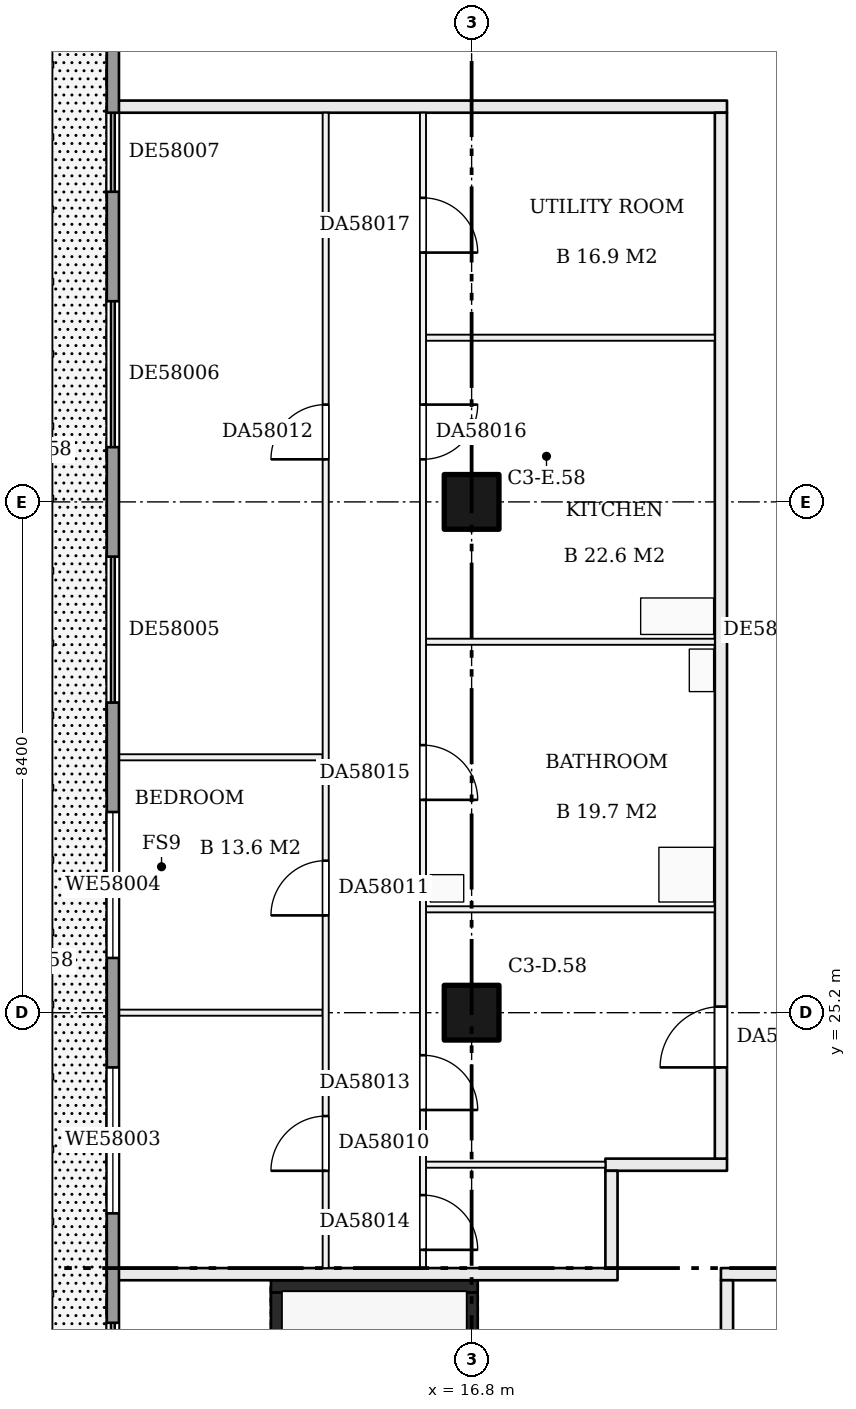
"""IFC4 building model, lengths in metres.
Left out: names, types, materials, properties, quantities, classifications, styles, units other than length and angle.
Written with IfcOpenShell. Run it as: python <this file> out.ifc"""

import sys

from ifc_helpers import new_model, si_unit, direction, frame, frame_2d, origin, origin_2d, place, context, subcontext, project, spatial, rectangle, extrude, element, fill, save


model = new_model("IFC4")
c1 = context("Model", 3, precision=1e-05, world=origin(), true_north=direction((0.0, 1.0)))
c2 = subcontext(c1, "Body", "Model", "MODEL_VIEW")
j1 = project(units=[si_unit("LENGTHUNIT", "METRE"), si_unit("PLANEANGLEUNIT", "RADIAN")], contexts=[c1])
p1 = place(None, origin())
s1 = spatial("IfcSite", under=j1, at=p1, CompositionType="ELEMENT")
p2 = place(p1, origin())
s2 = spatial("IfcBuilding", under=s1, at=p2, CompositionType="ELEMENT")
p3 = place(p2, frame((0.0, 0.0, 224.7)))
s3 = spatial("IfcBuildingStorey", under=s2, at=p3, CompositionType="ELEMENT", Elevation=224.7)
for number, where, z_axis, x_axis in (
    (1, (16.8, 25.2, 0.0), (0.0, 0.0, 1.0), (1.0, 0.0, 0.0)),
    (2, (16.8, 33.6, 0.0), (0.0, 0.0, 1.0), (1.0, 0.0, 0.0)),
):
    element("IfcColumn", number, at=place(p3, frame(where, z_axis=z_axis, x_axis=x_axis)), inside=s3, PredefinedType="COLUMN", context=c2, shape_type="SweptSolid", body=[
        extrude(rectangle(XDim=0.9, YDim=0.9, at=origin_2d()), origin(), (0.0, 0.0, 1.0), 3.22),
    ])
p4 = place(p3, frame((13.6, 13.8, 0.0), z_axis=(0.0, 0.0, 1.0), x_axis=(0.0, 1.0, 0.0)))
e3 = element("IfcWall", 3, at=p4, inside=s3, PredefinedType="SHEAR", context=c2, shape_type="SweptSolid", body=[
    extrude(rectangle(XDim=6.8, YDim=0.2, at=frame_2d((3.4, 0.0))), origin(), (0.0, 0.0, 1.0), 3.22),
])
p5 = place(p3, frame((16.8, 13.8, 0.0), z_axis=(0.0, 0.0, 1.0), x_axis=(0.0, 1.0, 0.0)))
e4 = element("IfcWall", 4, at=p5, inside=s3, PredefinedType="SHEAR", context=c2, shape_type="SweptSolid", body=[
    extrude(rectangle(XDim=6.8, YDim=0.2, at=frame_2d((3.4, 0.0))), origin(), (0.0, 0.0, 1.0), 3.22),
])
p6 = place(p5, frame((0.1, 0.0, 0.0)))
e5 = element("IfcOpeningElement", 5, at=p6, cuts=e4, PredefinedType="OPENING", context=c2, shape_type="SweptSolid", body=[
    extrude(rectangle(XDim=1.0, YDim=2.1, at=frame_2d((0.5, 1.05))), frame((0.0, 0.11, 0.0), z_axis=(0.0, -1.0, 0.0), x_axis=(1.0, 0.0, 0.0)), (0.0, 0.0, 1.0), 0.22),
])
p7 = place(p3, frame((13.5, 20.7, 0.0), z_axis=(0.0, 0.0, 1.0), x_axis=(1.0, 0.0, 0.0)))
e6 = element("IfcWall", 6, at=p7, inside=s3, PredefinedType="SHEAR", context=c2, shape_type="SweptSolid", body=[
    extrude(rectangle(XDim=3.4, YDim=0.2, at=frame_2d((1.7, 0.0))), origin(), (0.0, 0.0, 1.0), 3.22),
])
p8 = place(p3, frame((10.9, 20.9, 0.0), z_axis=(0.0, 0.0, 1.0), x_axis=(1.0, 0.0, 0.0)))
e7 = element("IfcWall", 7, at=p8, inside=s3, PredefinedType="PARTITIONING", context=c2, shape_type="SweptSolid", body=[
    extrude(rectangle(XDim=8.3, YDim=0.2, at=frame_2d((4.15, 0.0))), origin(), (0.0, 0.0, 1.0), 3.22),
])
p9 = place(p3, frame((20.9, 20.9, 0.0), z_axis=(0.0, 0.0, 1.0), x_axis=(1.0, 0.0, 0.0)))
e8 = element("IfcWall", 8, at=p9, inside=s3, PredefinedType="PARTITIONING", context=c2, shape_type="SweptSolid", body=[
    extrude(rectangle(XDim=19.3, YDim=0.2, at=frame_2d((9.65, 0.0))), origin(), (0.0, 0.0, 1.0), 3.22),
])
p10 = place(p3, frame((16.05, 22.7, 0.0), z_axis=(0.0, 0.0, 1.0), x_axis=(1.0, 0.0, 0.0)))
e9 = element("IfcWall", 9, at=p10, inside=s3, PredefinedType="PARTITIONING", context=c2, shape_type="SweptSolid", body=[
    extrude(rectangle(XDim=2.95, YDim=0.1, at=frame_2d((1.475, 0.0))), origin(), (0.0, 0.0, 1.0), 3.22),
])
p11 = place(p3, frame((19.0, 22.7, 0.0), z_axis=(0.0, 0.0, 1.0), x_axis=(1.0, 0.0, 0.0)))
e10 = element("IfcWall", 10, at=p11, inside=s3, PredefinedType="PARTITIONING", context=c2, shape_type="SweptSolid", body=[
    extrude(rectangle(XDim=2.0, YDim=0.2, at=frame_2d((1.0, 0.0))), origin(), (0.0, 0.0, 1.0), 3.22),
])
p12 = place(p3, frame((10.9, 25.2, 0.0), z_axis=(0.0, 0.0, 1.0), x_axis=(1.0, 0.0, 0.0)))
e11 = element("IfcWall", 11, at=p12, inside=s3, PredefinedType="PARTITIONING", context=c2, shape_type="SweptSolid", body=[
    extrude(rectangle(XDim=3.45, YDim=0.1, at=frame_2d((1.725, 0.0))), origin(), (0.0, 0.0, 1.0), 3.22),
])
p13 = place(p3, frame((16.05, 26.9, 0.0), z_axis=(0.0, 0.0, 1.0), x_axis=(1.0, 0.0, 0.0)))
e12 = element("IfcWall", 12, at=p13, inside=s3, PredefinedType="PARTITIONING", context=c2, shape_type="SweptSolid", body=[
    extrude(rectangle(XDim=4.75, YDim=0.1, at=frame_2d((2.375, 0.0))), origin(), (0.0, 0.0, 1.0), 3.22),
])
p14 = place(p3, frame((10.9, 29.4, 0.0), z_axis=(0.0, 0.0, 1.0), x_axis=(1.0, 0.0, 0.0)))
e13 = element("IfcWall", 13, at=p14, inside=s3, PredefinedType="PARTITIONING", context=c2, shape_type="SweptSolid", body=[
    extrude(rectangle(XDim=3.45, YDim=0.1, at=frame_2d((1.725, 0.0))), origin(), (0.0, 0.0, 1.0), 3.22),
])
for number, where, z_axis, x_axis in (
    (14, (16.05, 31.3, 0.0), (0.0, 0.0, 1.0), (1.0, 0.0, 0.0)),
    (15, (16.05, 36.3, 0.0), (0.0, 0.0, 1.0), (1.0, 0.0, 0.0)),
):
    element("IfcWall", number, at=place(p3, frame(where, z_axis=z_axis, x_axis=x_axis)), inside=s3, PredefinedType="PARTITIONING", context=c2, shape_type="SweptSolid", body=[
        extrude(rectangle(XDim=4.75, YDim=0.1, at=frame_2d((2.375, 0.0))), origin(), (0.0, 0.0, 1.0), 3.22),
    ])
p15 = place(p3, frame((10.9, 40.1, 0.0), z_axis=(0.0, 0.0, 1.0), x_axis=(1.0, 0.0, 0.0)))
e16 = element("IfcWall", 16, at=p15, inside=s3, PredefinedType="PARTITIONING", context=c2, shape_type="SweptSolid", body=[
    extrude(rectangle(XDim=10.1, YDim=0.2, at=frame_2d((5.05, 0.0))), origin(), (0.0, 0.0, 1.0), 3.22),
])
p16 = place(p3, frame((14.4, 21.0, 0.0), z_axis=(0.0, 0.0, 1.0), x_axis=(0.0, 1.0, 0.0)))
e17 = element("IfcWall", 17, at=p16, inside=s3, PredefinedType="PARTITIONING", context=c2, shape_type="SweptSolid", body=[
    extrude(rectangle(XDim=19.0, YDim=0.1, at=frame_2d((9.5, 0.0))), origin(), (0.0, 0.0, 1.0), 3.22),
])
p17 = place(p16, frame((1.6, 0.0, 0.0)))
e18 = element("IfcOpeningElement", 18, at=p17, cuts=e17, PredefinedType="OPENING", context=c2, shape_type="SweptSolid", body=[
    extrude(rectangle(XDim=0.9, YDim=2.1, at=frame_2d((0.45, 1.05))), frame((0.0, 0.06, 0.0), z_axis=(0.0, -1.0, 0.0), x_axis=(1.0, 0.0, 0.0)), (0.0, 0.0, 1.0), 0.12),
])
p18 = place(p16, frame((5.8, 0.0, 0.0)))
e19 = element("IfcOpeningElement", 19, at=p18, cuts=e17, PredefinedType="OPENING", context=c2, shape_type="SweptSolid", body=[
    extrude(rectangle(XDim=0.9, YDim=2.1, at=frame_2d((0.45, 1.05))), frame((0.0, 0.06, 0.0), z_axis=(0.0, -1.0, 0.0), x_axis=(1.0, 0.0, 0.0)), (0.0, 0.0, 1.0), 0.12),
])
p19 = place(p16, frame((13.3, 0.0, 0.0)))
e20 = element("IfcOpeningElement", 20, at=p19, cuts=e17, PredefinedType="OPENING", context=c2, shape_type="SweptSolid", body=[
    extrude(rectangle(XDim=0.9, YDim=2.1, at=frame_2d((0.45, 1.05))), frame((0.0, 0.06, 0.0), z_axis=(0.0, -1.0, 0.0), x_axis=(1.0, 0.0, 0.0)), (0.0, 0.0, 1.0), 0.12),
])
p20 = place(p3, frame((16.0, 21.0, 0.0), z_axis=(0.0, 0.0, 1.0), x_axis=(0.0, 1.0, 0.0)))
e21 = element("IfcWall", 21, at=p20, inside=s3, PredefinedType="PARTITIONING", context=c2, shape_type="SweptSolid", body=[
    extrude(rectangle(XDim=19.0, YDim=0.1, at=frame_2d((9.5, 0.0))), origin(), (0.0, 0.0, 1.0), 3.22),
])
p21 = place(p20, frame((2.6, 0.0, 0.0)))
e22 = element("IfcOpeningElement", 22, at=p21, cuts=e21, PredefinedType="OPENING", context=c2, shape_type="SweptSolid", body=[
    extrude(rectangle(XDim=0.9, YDim=2.1, at=frame_2d((0.45, 1.05))), frame((0.0, 0.06, 0.0), z_axis=(0.0, -1.0, 0.0), x_axis=(1.0, 0.0, 0.0)), (0.0, 0.0, 1.0), 0.12),
])
p22 = place(p20, frame((0.3, 0.0, 0.0)))
e23 = element("IfcOpeningElement", 23, at=p22, cuts=e21, PredefinedType="OPENING", context=c2, shape_type="SweptSolid", body=[
    extrude(rectangle(XDim=0.9, YDim=2.1, at=frame_2d((0.45, 1.05))), frame((0.0, 0.06, 0.0), z_axis=(0.0, -1.0, 0.0), x_axis=(1.0, 0.0, 0.0)), (0.0, 0.0, 1.0), 0.12),
])
p23 = place(p20, frame((7.7, 0.0, 0.0)))
e24 = element("IfcOpeningElement", 24, at=p23, cuts=e21, PredefinedType="OPENING", context=c2, shape_type="SweptSolid", body=[
    extrude(rectangle(XDim=0.9, YDim=2.1, at=frame_2d((0.45, 1.05))), frame((0.0, 0.06, 0.0), z_axis=(0.0, -1.0, 0.0), x_axis=(1.0, 0.0, 0.0)), (0.0, 0.0, 1.0), 0.12),
])
p24 = place(p20, frame((13.3, 0.0, 0.0)))
e25 = element("IfcOpeningElement", 25, at=p24, cuts=e21, PredefinedType="OPENING", context=c2, shape_type="SweptSolid", body=[
    extrude(rectangle(XDim=0.9, YDim=2.1, at=frame_2d((0.45, 1.05))), frame((0.0, 0.06, 0.0), z_axis=(0.0, -1.0, 0.0), x_axis=(1.0, 0.0, 0.0)), (0.0, 0.0, 1.0), 0.12),
])
p25 = place(p20, frame((16.7, 0.0, 0.0)))
e26 = element("IfcOpeningElement", 26, at=p25, cuts=e21, PredefinedType="OPENING", context=c2, shape_type="SweptSolid", body=[
    extrude(rectangle(XDim=0.9, YDim=2.1, at=frame_2d((0.45, 1.05))), frame((0.0, 0.06, 0.0), z_axis=(0.0, -1.0, 0.0), x_axis=(1.0, 0.0, 0.0)), (0.0, 0.0, 1.0), 0.12),
])
p26 = place(p3, frame((19.1, 21.0, 0.0), z_axis=(0.0, 0.0, 1.0), x_axis=(0.0, 1.0, 0.0)))
e27 = element("IfcWall", 27, at=p26, inside=s3, PredefinedType="PARTITIONING", context=c2, shape_type="SweptSolid", body=[
    extrude(rectangle(XDim=1.6, YDim=0.2, at=frame_2d((0.8, 0.0))), origin(), (0.0, 0.0, 1.0), 3.22),
])
p27 = place(p3, frame((20.9, 22.8, 0.0), z_axis=(0.0, 0.0, 1.0), x_axis=(0.0, 1.0, 0.0)))
e28 = element("IfcWall", 28, at=p27, inside=s3, PredefinedType="PARTITIONING", context=c2, shape_type="SweptSolid", body=[
    extrude(rectangle(XDim=17.2, YDim=0.2, at=frame_2d((8.6, 0.0))), origin(), (0.0, 0.0, 1.0), 3.22),
])
p28 = place(p27, frame((1.5, 0.0, 0.0)))
e29 = element("IfcOpeningElement", 29, at=p28, cuts=e28, PredefinedType="OPENING", context=c2, shape_type="SweptSolid", body=[
    extrude(rectangle(XDim=1.0, YDim=2.1, at=frame_2d((0.5, 1.05))), frame((0.0, 0.11, 0.0), z_axis=(0.0, -1.0, 0.0), x_axis=(1.0, 0.0, 0.0)), (0.0, 0.0, 1.0), 0.22),
])
p29 = place(p3, frame((21.0, 13.7, 0.0), z_axis=(0.0, 0.0, 1.0), x_axis=(0.0, 1.0, 0.0)))
e30 = element("IfcWall", 30, at=p29, inside=s3, PredefinedType="PARTITIONING", context=c2, shape_type="SweptSolid", body=[
    extrude(rectangle(XDim=7.1, YDim=0.2, at=frame_2d((3.55, 0.0))), origin(), (0.0, 0.0, 1.0), 3.22),
])
p30 = place(p3, frame((10.9, 42.0, 0.0), z_axis=(0.0, 0.0, 1.0), x_axis=(0.0, -1.0, 0.0)))
e31 = element("IfcWall", 31, at=p30, inside=s3, PredefinedType="SOLIDWALL", context=c2, shape_type="SweptSolid", body=[
    extrude(rectangle(XDim=28.6, YDim=0.2, at=frame_2d((14.3, 0.0))), origin(), (0.0, 0.0, 1.0), 3.22),
])
p31 = place(p30, frame((25.9, 0.0, 0.0)))
e32 = element("IfcOpeningElement", 32, at=p31, cuts=e31, PredefinedType="OPENING", context=c2, shape_type="SweptSolid", body=[
    extrude(rectangle(XDim=2.4, YDim=2.2, at=frame_2d((1.2, 1.1))), frame((0.0, 0.11, 0.0), z_axis=(0.0, -1.0, 0.0), x_axis=(1.0, 0.0, 0.0)), (0.0, 0.0, 1.0), 0.22),
])
p32 = place(p30, frame((21.9, 0.0, 0.0)))
e33 = element("IfcOpeningElement", 33, at=p32, cuts=e31, PredefinedType="OPENING", context=c2, shape_type="SweptSolid", body=[
    extrude(rectangle(XDim=2.4, YDim=2.2, at=frame_2d((1.2, 1.1))), frame((0.0, 0.11, 0.0), z_axis=(0.0, -1.0, 0.0), x_axis=(1.0, 0.0, 0.0)), (0.0, 0.0, 1.0), 0.22),
])
p33 = place(p30, frame((17.7, 0.0, 0.9)))
e34 = element("IfcOpeningElement", 34, at=p33, cuts=e31, PredefinedType="OPENING", context=c2, shape_type="SweptSolid", body=[
    extrude(rectangle(XDim=2.4, YDim=1.5, at=frame_2d((1.2, 0.75))), frame((0.0, 0.11, 0.0), z_axis=(0.0, -1.0, 0.0), x_axis=(1.0, 0.0, 0.0)), (0.0, 0.0, 1.0), 0.22),
])
p34 = place(p30, frame((13.5, 0.0, 0.9)))
e35 = element("IfcOpeningElement", 35, at=p34, cuts=e31, PredefinedType="OPENING", context=c2, shape_type="SweptSolid", body=[
    extrude(rectangle(XDim=2.4, YDim=1.5, at=frame_2d((1.2, 0.75))), frame((0.0, 0.11, 0.0), z_axis=(0.0, -1.0, 0.0), x_axis=(1.0, 0.0, 0.0)), (0.0, 0.0, 1.0), 0.22),
])
p35 = place(p30, frame((9.3, 0.0, 0.0)))
e36 = element("IfcOpeningElement", 36, at=p35, cuts=e31, PredefinedType="OPENING", context=c2, shape_type="SweptSolid", body=[
    extrude(rectangle(XDim=2.4, YDim=2.2, at=frame_2d((1.2, 1.1))), frame((0.0, 0.11, 0.0), z_axis=(0.0, -1.0, 0.0), x_axis=(1.0, 0.0, 0.0)), (0.0, 0.0, 1.0), 0.22),
])
p36 = place(p30, frame((5.1, 0.0, 0.0)))
e37 = element("IfcOpeningElement", 37, at=p36, cuts=e31, PredefinedType="OPENING", context=c2, shape_type="SweptSolid", body=[
    extrude(rectangle(XDim=2.4, YDim=2.2, at=frame_2d((1.2, 1.1))), frame((0.0, 0.11, 0.0), z_axis=(0.0, -1.0, 0.0), x_axis=(1.0, 0.0, 0.0)), (0.0, 0.0, 1.0), 0.22),
])
p37 = place(p30, frame((2.0, 0.0, 0.0)))
e38 = element("IfcOpeningElement", 38, at=p37, cuts=e31, PredefinedType="OPENING", context=c2, shape_type="SweptSolid", body=[
    extrude(rectangle(XDim=1.3, YDim=2.2, at=frame_2d((0.65, 1.1))), frame((0.0, 0.11, 0.0), z_axis=(0.0, -1.0, 0.0), x_axis=(1.0, 0.0, 0.0)), (0.0, 0.0, 1.0), 0.22),
])
p38 = place(p17, origin())
e39 = element("IfcDoor", 39, at=p38, inside=s3, OperationType="SINGLE_SWING_LEFT", PredefinedType="DOOR", context=c2, shape_type="SweptSolid", body=[
    extrude(rectangle(XDim=0.9, YDim=2.1, at=frame_2d((0.45, 1.05))), frame((0.0, 0.025, 0.0), z_axis=(0.0, -1.0, 0.0), x_axis=(1.0, 0.0, 0.0)), (0.0, 0.0, 1.0), 0.05),
])
fill(e18, e39)
p39 = place(p18, origin())
e40 = element("IfcDoor", 40, at=p39, inside=s3, OperationType="SINGLE_SWING_LEFT", PredefinedType="DOOR", context=c2, shape_type="SweptSolid", body=[
    extrude(rectangle(XDim=0.9, YDim=2.1, at=frame_2d((0.45, 1.05))), frame((0.0, 0.025, 0.0), z_axis=(0.0, -1.0, 0.0), x_axis=(1.0, 0.0, 0.0)), (0.0, 0.0, 1.0), 0.05),
])
fill(e19, e40)
p40 = place(p19, origin())
e41 = element("IfcDoor", 41, at=p40, inside=s3, OperationType="SINGLE_SWING_LEFT", PredefinedType="DOOR", context=c2, shape_type="SweptSolid", body=[
    extrude(rectangle(XDim=0.9, YDim=2.1, at=frame_2d((0.45, 1.05))), frame((0.0, 0.025, 0.0), z_axis=(0.0, -1.0, 0.0), x_axis=(1.0, 0.0, 0.0)), (0.0, 0.0, 1.0), 0.05),
])
fill(e20, e41)
p41 = place(p21, frame((0.9, 0.0, 0.0), z_axis=(0.0, 0.0, 1.0), x_axis=(-1.0, 0.0, 0.0)))
e42 = element("IfcDoor", 42, at=p41, inside=s3, OperationType="SINGLE_SWING_RIGHT", PredefinedType="DOOR", context=c2, shape_type="SweptSolid", body=[
    extrude(rectangle(XDim=0.9, YDim=2.1, at=frame_2d((0.45, 1.05))), frame((0.0, 0.025, 0.0), z_axis=(0.0, -1.0, 0.0), x_axis=(1.0, 0.0, 0.0)), (0.0, 0.0, 1.0), 0.05),
])
fill(e22, e42)
p42 = place(p22, frame((0.9, 0.0, 0.0), z_axis=(0.0, 0.0, 1.0), x_axis=(-1.0, 0.0, 0.0)))
e43 = element("IfcDoor", 43, at=p42, inside=s3, OperationType="SINGLE_SWING_RIGHT", PredefinedType="DOOR", context=c2, shape_type="SweptSolid", body=[
    extrude(rectangle(XDim=0.9, YDim=2.1, at=frame_2d((0.45, 1.05))), frame((0.0, 0.025, 0.0), z_axis=(0.0, -1.0, 0.0), x_axis=(1.0, 0.0, 0.0)), (0.0, 0.0, 1.0), 0.05),
])
fill(e23, e43)
p43 = place(p23, frame((0.9, 0.0, 0.0), z_axis=(0.0, 0.0, 1.0), x_axis=(-1.0, 0.0, 0.0)))
e44 = element("IfcDoor", 44, at=p43, inside=s3, OperationType="SINGLE_SWING_RIGHT", PredefinedType="DOOR", context=c2, shape_type="SweptSolid", body=[
    extrude(rectangle(XDim=0.9, YDim=2.1, at=frame_2d((0.45, 1.05))), frame((0.0, 0.025, 0.0), z_axis=(0.0, -1.0, 0.0), x_axis=(1.0, 0.0, 0.0)), (0.0, 0.0, 1.0), 0.05),
])
fill(e24, e44)
p44 = place(p24, frame((0.9, 0.0, 0.0), z_axis=(0.0, 0.0, 1.0), x_axis=(-1.0, 0.0, 0.0)))
e45 = element("IfcDoor", 45, at=p44, inside=s3, OperationType="SINGLE_SWING_LEFT", PredefinedType="DOOR", context=c2, shape_type="SweptSolid", body=[
    extrude(rectangle(XDim=0.9, YDim=2.1, at=frame_2d((0.45, 1.05))), frame((0.0, 0.025, 0.0), z_axis=(0.0, -1.0, 0.0), x_axis=(1.0, 0.0, 0.0)), (0.0, 0.0, 1.0), 0.05),
])
fill(e25, e45)
p45 = place(p25, frame((0.9, 0.0, 0.0), z_axis=(0.0, 0.0, 1.0), x_axis=(-1.0, 0.0, 0.0)))
e46 = element("IfcDoor", 46, at=p45, inside=s3, OperationType="SINGLE_SWING_RIGHT", PredefinedType="DOOR", context=c2, shape_type="SweptSolid", body=[
    extrude(rectangle(XDim=0.9, YDim=2.1, at=frame_2d((0.45, 1.05))), frame((0.0, 0.025, 0.0), z_axis=(0.0, -1.0, 0.0), x_axis=(1.0, 0.0, 0.0)), (0.0, 0.0, 1.0), 0.05),
])
fill(e26, e46)
p46 = place(p28, origin())
e47 = element("IfcDoor", 47, at=p46, inside=s3, OperationType="SINGLE_SWING_LEFT", PredefinedType="DOOR", context=c2, shape_type="SweptSolid", body=[
    extrude(rectangle(XDim=1.0, YDim=2.1, at=frame_2d((0.5, 1.05))), frame((0.0, 0.025, 0.0), z_axis=(0.0, -1.0, 0.0), x_axis=(1.0, 0.0, 0.0)), (0.0, 0.0, 1.0), 0.05),
])
fill(e29, e47)
p47 = place(p32, origin())
e48 = element("IfcDoor", 48, at=p47, inside=s3, OperationType="DOUBLE_DOOR_SLIDING", PredefinedType="DOOR", context=c2, shape_type="SweptSolid", body=[
    extrude(rectangle(XDim=2.4, YDim=2.2, at=frame_2d((1.2, 1.1))), frame((0.0, 0.025, 0.0), z_axis=(0.0, -1.0, 0.0), x_axis=(1.0, 0.0, 0.0)), (0.0, 0.0, 1.0), 0.05),
])
fill(e33, e48)
p48 = place(p33, origin())
e49 = element("IfcWindow", 49, at=p48, inside=s3, PartitioningType="SINGLE_PANEL", PredefinedType="WINDOW", context=c2, shape_type="SweptSolid", body=[
    extrude(rectangle(XDim=2.4, YDim=1.5, at=frame_2d((1.2, 0.75))), frame((0.0, 0.03, 0.0), z_axis=(0.0, -1.0, 0.0), x_axis=(1.0, 0.0, 0.0)), (0.0, 0.0, 1.0), 0.06),
])
fill(e34, e49)
p49 = place(p34, origin())
e50 = element("IfcWindow", 50, at=p49, inside=s3, PartitioningType="SINGLE_PANEL", PredefinedType="WINDOW", context=c2, shape_type="SweptSolid", body=[
    extrude(rectangle(XDim=2.4, YDim=1.5, at=frame_2d((1.2, 0.75))), frame((0.0, 0.03, 0.0), z_axis=(0.0, -1.0, 0.0), x_axis=(1.0, 0.0, 0.0)), (0.0, 0.0, 1.0), 0.06),
])
fill(e35, e50)
p50 = place(p35, origin())
e51 = element("IfcDoor", 51, at=p50, inside=s3, OperationType="DOUBLE_DOOR_SLIDING", PredefinedType="DOOR", context=c2, shape_type="SweptSolid", body=[
    extrude(rectangle(XDim=2.4, YDim=2.2, at=frame_2d((1.2, 1.1))), frame((0.0, 0.025, 0.0), z_axis=(0.0, -1.0, 0.0), x_axis=(1.0, 0.0, 0.0)), (0.0, 0.0, 1.0), 0.05),
])
fill(e36, e51)
p51 = place(p36, origin())
e52 = element("IfcDoor", 52, at=p51, inside=s3, OperationType="DOUBLE_DOOR_SLIDING", PredefinedType="DOOR", context=c2, shape_type="SweptSolid", body=[
    extrude(rectangle(XDim=2.4, YDim=2.2, at=frame_2d((1.2, 1.1))), frame((0.0, 0.025, 0.0), z_axis=(0.0, -1.0, 0.0), x_axis=(1.0, 0.0, 0.0)), (0.0, 0.0, 1.0), 0.05),
])
fill(e37, e52)
p52 = place(p37, origin())
e53 = element("IfcDoor", 53, at=p52, inside=s3, OperationType="DOUBLE_DOOR_SLIDING", PredefinedType="DOOR", context=c2, shape_type="SweptSolid", body=[
    extrude(rectangle(XDim=1.3, YDim=2.2, at=frame_2d((0.65, 1.1))), frame((0.0, 0.025, 0.0), z_axis=(0.0, -1.0, 0.0), x_axis=(1.0, 0.0, 0.0)), (0.0, 0.0, 1.0), 0.05),
])
fill(e38, e53)
save(model, sys.argv[1])
